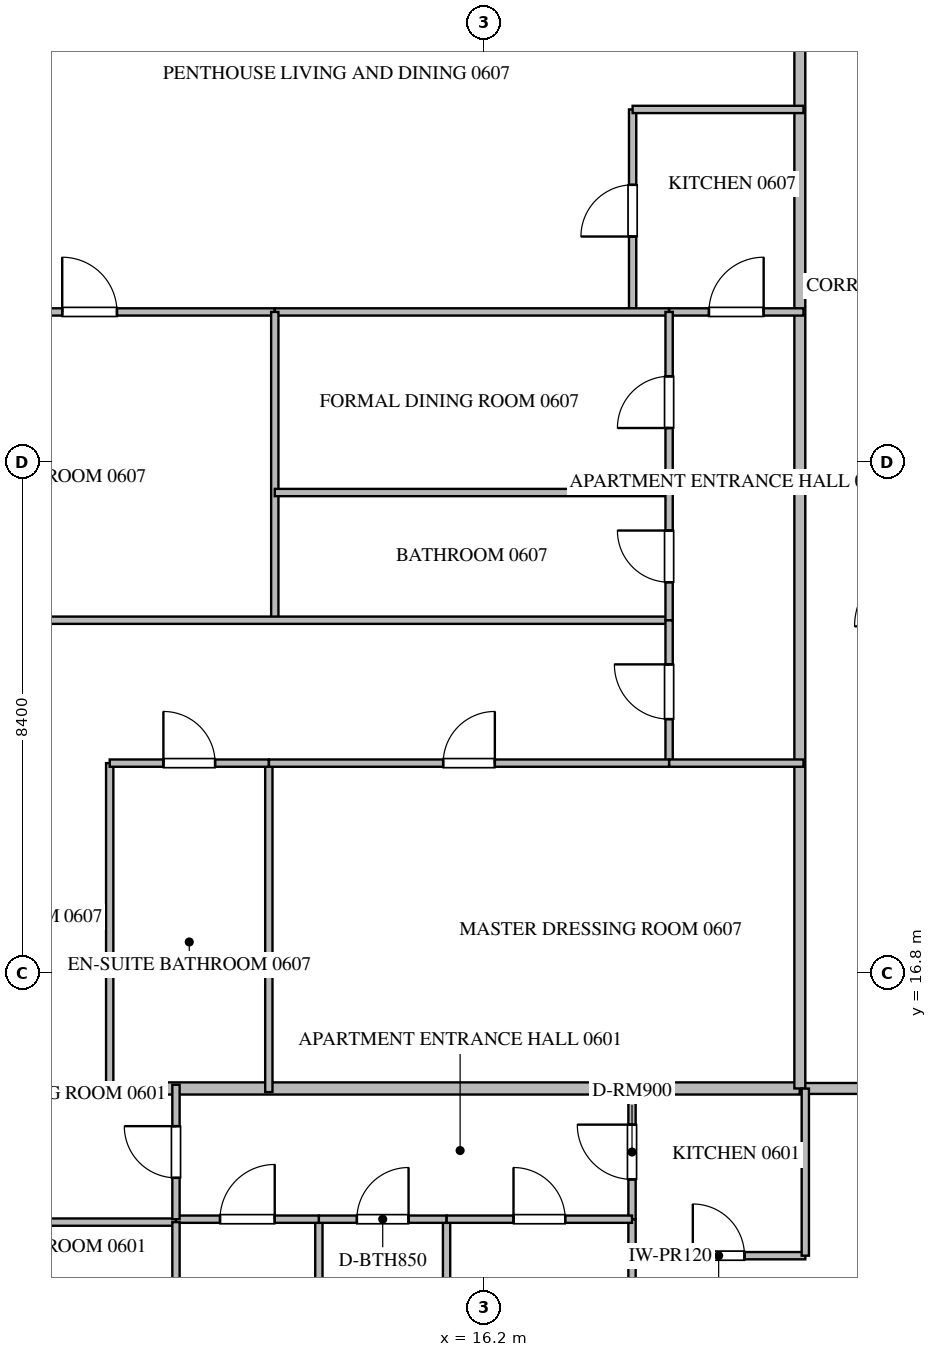
"""IFC4 building model, lengths in metres.
Left out: names, types, materials, properties, quantities, classifications, styles, units other than length and angle.
Written with IfcOpenShell. Run it as: python <this file> out.ifc"""

import sys

from ifc_helpers import new_model, si_unit, direction, frame, frame_2d, origin, place, context, subcontext, project, spatial, rectangle, extrude, source, transform, mapped, element, fill, save


model = new_model("IFC4")
c1 = context("Model", 3, precision=1e-05, world=origin(), true_north=direction((0.0, 1.0)))
c2 = subcontext(c1, "Body", "Model", "MODEL_VIEW")
j1 = project(units=[si_unit("LENGTHUNIT", "METRE"), si_unit("PLANEANGLEUNIT", "RADIAN")], contexts=[c1])
p1 = place(None, origin())
s1 = spatial("IfcSite", under=j1, at=p1, CompositionType="ELEMENT")
p2 = place(p1, origin())
s2 = spatial("IfcBuilding", under=s1, at=p2, CompositionType="ELEMENT")
p3 = place(p2, frame((0.0, 0.0, 30.45)))
s3 = spatial("IfcBuildingStorey", under=s2, at=p3, CompositionType="ELEMENT", Elevation=30.45)
p4 = place(p3, frame((6.082, 14.9, 0.0), z_axis=(0.0, 0.0, 1.0), x_axis=(1.0, 0.0, 0.0)))
e1 = element("IfcWall", 1, at=p4, inside=s3, PredefinedType="PARTITIONING", context=c2, shape_type="SweptSolid", body=[
    extrude(rectangle(XDim=15.318, YDim=0.2, at=frame_2d((7.659, 0.0))), origin(), (0.0, 0.0, 1.0), 3.49),
])
p5 = place(p3, frame((21.402, 14.9, 0.0), z_axis=(0.0, 0.0, 1.0), x_axis=(1.0, 0.0, 0.0)))
e2 = element("IfcWall", 2, at=p5, inside=s3, PredefinedType="PARTITIONING", context=c2, shape_type="SweptSolid", body=[
    extrude(rectangle(XDim=21.996, YDim=0.18, at=frame_2d((10.998, 0.0))), origin(), (0.0, 0.0, 1.0), 3.49),
])
p6 = place(p5, frame((2.1, 0.0, 0.0)))
e3 = element("IfcOpeningElement", 3, at=p6, cuts=e2, PredefinedType="OPENING", context=c2, shape_type="SweptSolid", body=[
    extrude(rectangle(XDim=1.0, YDim=2.15, at=frame_2d((0.5, 1.075))), frame((0.0, 0.1, 0.0), z_axis=(0.0, -1.0, 0.0), x_axis=(1.0, 0.0, 0.0)), (0.0, 0.0, 1.0), 0.2),
])
p7 = place(p5, frame((6.719, 0.0, 0.0)))
e4 = element("IfcOpeningElement", 4, at=p7, cuts=e2, PredefinedType="OPENING", context=c2, shape_type="SweptSolid", body=[
    extrude(rectangle(XDim=1.0, YDim=2.15, at=frame_2d((0.5, 1.075))), frame((0.0, 0.1, 0.0), z_axis=(0.0, -1.0, 0.0), x_axis=(1.0, 0.0, 0.0)), (0.0, 0.0, 1.0), 0.2),
])
p8 = place(p5, frame((18.896, 0.0, 0.0)))
e5 = element("IfcOpeningElement", 5, at=p8, cuts=e2, PredefinedType="OPENING", context=c2, shape_type="SweptSolid", body=[
    extrude(rectangle(XDim=1.0, YDim=2.15, at=frame_2d((0.5, 1.075))), frame((0.0, 0.1, 0.0), z_axis=(0.0, -1.0, 0.0), x_axis=(1.0, 0.0, 0.0)), (0.0, 0.0, 1.0), 0.2),
])
p9 = place(p3, frame((21.4, 14.9, 0.0), z_axis=(0.0, 0.0, 1.0), x_axis=(0.0, 1.0, 0.0)))
e6 = element("IfcWall", 6, at=p9, inside=s3, PredefinedType="PARTITIONING", context=c2, shape_type="SweptSolid", body=[
    extrude(rectangle(XDim=20.6, YDim=0.18, at=frame_2d((10.3, 0.0))), origin(), (0.0, 0.0, 1.0), 3.49),
])
p10 = place(p9, frame((17.64, 0.0, 0.0)))
e7 = element("IfcOpeningElement", 7, at=p10, cuts=e6, PredefinedType="OPENING", context=c2, shape_type="SweptSolid", body=[
    extrude(rectangle(XDim=1.0, YDim=2.15, at=frame_2d((0.5, 1.075))), frame((0.0, 0.1, 0.0), z_axis=(0.0, -1.0, 0.0), x_axis=(1.0, 0.0, 0.0)), (0.0, 0.0, 1.0), 0.2),
])
p11 = place(p3, frame((18.64, 12.15, 0.0), z_axis=(0.0, 0.0, 1.0), x_axis=(1.0, 0.0, 0.0)))
e8 = element("IfcWall", 8, at=p11, inside=s3, PredefinedType="PARTITIONING", context=c2, shape_type="SweptSolid", body=[
    extrude(rectangle(XDim=2.85, YDim=0.12, at=frame_2d((1.425, 0.0))), origin(), (0.0, 0.0, 1.0), 3.49),
])
p12 = place(p11, frame((1.0, 0.0, 0.0)))
e9 = element("IfcOpeningElement", 9, at=p12, cuts=e8, PredefinedType="OPENING", context=c2, shape_type="SweptSolid", body=[
    extrude(rectangle(XDim=0.85, YDim=2.1, at=frame_2d((0.425, 1.05))), frame((0.0, 0.07, 0.0), z_axis=(0.0, -1.0, 0.0), x_axis=(1.0, 0.0, 0.0)), (0.0, 0.0, 1.0), 0.14),
])
p13 = place(p3, frame((21.49, 12.15, 0.0), z_axis=(0.0, 0.0, 1.0), x_axis=(0.0, 1.0, 0.0)))
e10 = element("IfcWall", 10, at=p13, inside=s3, PredefinedType="PARTITIONING", context=c2, shape_type="SweptSolid", body=[
    extrude(rectangle(XDim=2.748, YDim=0.12, at=frame_2d((1.374, 0.0))), origin(), (0.0, 0.0, 1.0), 3.49),
])
p14 = place(p3, frame((18.64, 12.75, 0.0), z_axis=(0.0, 0.0, 1.0), x_axis=(0.0, 1.0, 0.0)))
e11 = element("IfcWall", 11, at=p14, inside=s3, PredefinedType="PARTITIONING", context=c2, shape_type="SweptSolid", body=[
    extrude(rectangle(XDim=2.21, YDim=0.12, at=frame_2d((1.105, 0.0))), origin(), (0.0, 0.0, 1.0), 3.49),
])
p15 = place(p14, frame((0.655, 0.0, 0.0)))
e12 = element("IfcOpeningElement", 12, at=p15, cuts=e11, PredefinedType="OPENING", context=c2, shape_type="SweptSolid", body=[
    extrude(rectangle(XDim=0.9, YDim=2.1, at=frame_2d((0.45, 1.05))), frame((0.0, 0.07, 0.0), z_axis=(0.0, -1.0, 0.0), x_axis=(1.0, 0.0, 0.0)), (0.0, 0.0, 1.0), 0.14),
])
p16 = place(p3, frame((18.64, 7.73, 0.0), z_axis=(0.0, 0.0, 1.0), x_axis=(0.0, 1.0, 0.0)))
e13 = element("IfcWall", 13, at=p16, inside=s3, PredefinedType="PARTITIONING", context=c2, shape_type="SweptSolid", body=[
    extrude(rectangle(XDim=5.018, YDim=0.12, at=frame_2d((2.509, 0.0))), origin(), (0.0, 0.0, 1.0), 3.49),
])
p17 = place(p3, frame((13.49, 4.495, 0.0), z_axis=(0.0, 0.0, 1.0), x_axis=(0.0, 1.0, 0.0)))
e14 = element("IfcWall", 14, at=p17, inside=s3, PredefinedType="PARTITIONING", context=c2, shape_type="SweptSolid", body=[
    extrude(rectangle(XDim=8.255, YDim=0.12, at=frame_2d((4.127, 0.0))), origin(), (0.0, 0.0, 1.0), 3.49),
])
p18 = place(p3, frame((15.59, 7.728, 0.0), z_axis=(0.0, 0.0, 1.0), x_axis=(0.0, 1.0, 0.0)))
e15 = element("IfcWall", 15, at=p18, inside=s3, PredefinedType="PARTITIONING", context=c2, shape_type="SweptSolid", body=[
    extrude(rectangle(XDim=5.022, YDim=0.12, at=frame_2d((2.511, 0.0))), origin(), (0.0, 0.0, 1.0), 3.49),
])
p19 = place(p3, frame((13.49, 12.75, 0.0), z_axis=(0.0, 0.0, 1.0), x_axis=(1.0, 0.0, 0.0)))
e16 = element("IfcWall", 16, at=p19, inside=s3, PredefinedType="PARTITIONING", context=c2, shape_type="SweptSolid", body=[
    extrude(rectangle(XDim=2.1, YDim=0.12, at=frame_2d((1.05, 0.0))), origin(), (0.0, 0.0, 1.0), 3.49),
])
p20 = place(p19, frame((0.625, 0.0, 0.0)))
e17 = element("IfcOpeningElement", 17, at=p20, cuts=e16, PredefinedType="OPENING", context=c2, shape_type="SweptSolid", body=[
    extrude(rectangle(XDim=0.85, YDim=2.1, at=frame_2d((0.425, 1.05))), frame((0.0, 0.07, 0.0), z_axis=(0.0, -1.0, 0.0), x_axis=(1.0, 0.0, 0.0)), (0.0, 0.0, 1.0), 0.14),
])
p21 = place(p3, frame((15.592, 12.75, 0.0), z_axis=(0.0, 0.0, 1.0), x_axis=(1.0, 0.0, 0.0)))
e18 = element("IfcWall", 18, at=p21, inside=s3, PredefinedType="PARTITIONING", context=c2, shape_type="SweptSolid", body=[
    extrude(rectangle(XDim=3.048, YDim=0.12, at=frame_2d((1.524, 0.0))), origin(), (0.0, 0.0, 1.0), 3.49),
])
p22 = place(p21, frame((1.099, 0.0, 0.0)))
e19 = element("IfcOpeningElement", 19, at=p22, cuts=e18, PredefinedType="OPENING", context=c2, shape_type="SweptSolid", body=[
    extrude(rectangle(XDim=0.85, YDim=2.1, at=frame_2d((0.425, 1.05))), frame((0.0, 0.07, 0.0), z_axis=(0.0, -1.0, 0.0), x_axis=(1.0, 0.0, 0.0)), (0.0, 0.0, 1.0), 0.14),
])
p23 = place(p3, frame((11.14, 12.75, 0.0), z_axis=(0.0, 0.0, 1.0), x_axis=(1.0, 0.0, 0.0)))
e20 = element("IfcWall", 20, at=p23, inside=s3, PredefinedType="PARTITIONING", context=c2, shape_type="SweptSolid", body=[
    extrude(rectangle(XDim=2.348, YDim=0.12, at=frame_2d((1.174, 0.0))), origin(), (0.0, 0.0, 1.0), 3.49),
])
p24 = place(p23, frame((0.724, 0.0, 0.0)))
e21 = element("IfcOpeningElement", 21, at=p24, cuts=e20, PredefinedType="OPENING", context=c2, shape_type="SweptSolid", body=[
    extrude(rectangle(XDim=0.9, YDim=2.1, at=frame_2d((0.45, 1.05))), frame((0.0, 0.07, 0.0), z_axis=(0.0, -1.0, 0.0), x_axis=(1.0, 0.0, 0.0)), (0.0, 0.0, 1.0), 0.14),
])
p25 = place(p3, frame((6.095, 12.702, 0.0), z_axis=(0.0, 0.0, 1.0), x_axis=(1.0, 0.0, 0.0)))
e22 = element("IfcWall", 22, at=p25, inside=s3, PredefinedType="PARTITIONING", context=c2, shape_type="SweptSolid", body=[
    extrude(rectangle(XDim=5.043, YDim=0.12, at=frame_2d((2.521, 0.0))), origin(), (0.0, 0.0, 1.0), 3.49),
])
p26 = place(p3, frame((11.14, 9.894, 0.0), z_axis=(0.0, 0.0, 1.0), x_axis=(0.0, 1.0, 0.0)))
e23 = element("IfcWall", 23, at=p26, inside=s3, PredefinedType="PARTITIONING", context=c2, shape_type="SweptSolid", body=[
    extrude(rectangle(XDim=2.808, YDim=0.12, at=frame_2d((1.404, 0.0))), origin(), (0.0, 0.0, 1.0), 3.49),
])
p27 = place(p26, frame((0.979, 0.0, 0.0)))
e24 = element("IfcOpeningElement", 24, at=p27, cuts=e23, PredefinedType="OPENING", context=c2, shape_type="SweptSolid", body=[
    extrude(rectangle(XDim=0.85, YDim=2.1, at=frame_2d((0.425, 1.05))), frame((0.0, 0.07, 0.0), z_axis=(0.0, -1.0, 0.0), x_axis=(1.0, 0.0, 0.0)), (0.0, 0.0, 1.0), 0.14),
])
p28 = place(p3, frame((11.14, 12.75, 0.0), z_axis=(0.0, 0.0, 1.0), x_axis=(0.0, 1.0, 0.0)))
e25 = element("IfcWall", 25, at=p28, inside=s3, PredefinedType="PARTITIONING", context=c2, shape_type="SweptSolid", body=[
    extrude(rectangle(XDim=2.21, YDim=0.12, at=frame_2d((1.105, 0.0))), origin(), (0.0, 0.0, 1.0), 3.49),
])
p29 = place(p28, frame((0.68, 0.0, 0.0)))
e26 = element("IfcOpeningElement", 26, at=p29, cuts=e25, PredefinedType="OPENING", context=c2, shape_type="SweptSolid", body=[
    extrude(rectangle(XDim=0.85, YDim=2.1, at=frame_2d((0.425, 1.05))), frame((0.0, 0.07, 0.0), z_axis=(0.0, -1.0, 0.0), x_axis=(1.0, 0.0, 0.0)), (0.0, 0.0, 1.0), 0.14),
])
p30 = place(p3, frame((18.65, 27.67, 0.0), z_axis=(0.0, 0.0, 1.0), x_axis=(0.0, 1.0, 0.0)))
e27 = element("IfcWall", 27, at=p30, inside=s3, PredefinedType="PARTITIONING", context=c2, shape_type="SweptSolid", body=[
    extrude(rectangle(XDim=3.33, YDim=0.12, at=frame_2d((1.665, 0.0))), origin(), (0.0, 0.0, 1.0), 3.49),
])
p31 = place(p30, frame((1.24, 0.0, 0.0)))
e28 = element("IfcOpeningElement", 28, at=p31, cuts=e27, PredefinedType="OPENING", context=c2, shape_type="SweptSolid", body=[
    extrude(rectangle(XDim=0.85, YDim=2.1, at=frame_2d((0.425, 1.05))), frame((0.0, 0.07, 0.0), z_axis=(0.0, -1.0, 0.0), x_axis=(1.0, 0.0, 0.0)), (0.0, 0.0, 1.0), 0.14),
])
p32 = place(p3, frame((18.65, 31.0, 0.0), z_axis=(0.0, 0.0, 1.0), x_axis=(1.0, 0.0, 0.0)))
e29 = element("IfcWall", 29, at=p32, inside=s3, PredefinedType="PARTITIONING", context=c2, shape_type="SweptSolid", body=[
    extrude(rectangle(XDim=2.81, YDim=0.12, at=frame_2d((1.405, 0.0))), origin(), (0.0, 0.0, 1.0), 3.49),
])
p33 = place(p3, frame((19.25, 27.67, 0.0), z_axis=(0.0, 0.0, 1.0), x_axis=(1.0, 0.0, 0.0)))
e30 = element("IfcWall", 30, at=p33, inside=s3, PredefinedType="PARTITIONING", context=c2, shape_type="SweptSolid", body=[
    extrude(rectangle(XDim=2.21, YDim=0.12, at=frame_2d((1.105, 0.0))), origin(), (0.0, 0.0, 1.0), 3.49),
])
p34 = place(p33, frame((0.655, 0.0, 0.0)))
e31 = element("IfcOpeningElement", 31, at=p34, cuts=e30, PredefinedType="OPENING", context=c2, shape_type="SweptSolid", body=[
    extrude(rectangle(XDim=0.9, YDim=2.1, at=frame_2d((0.45, 1.05))), frame((0.0, 0.07, 0.0), z_axis=(0.0, -1.0, 0.0), x_axis=(1.0, 0.0, 0.0)), (0.0, 0.0, 1.0), 0.14),
])
p35 = place(p3, frame((6.095, 27.67, 0.0), z_axis=(0.0, 0.0, 1.0), x_axis=(1.0, 0.0, 0.0)))
e32 = element("IfcWall", 32, at=p35, inside=s3, PredefinedType="PARTITIONING", context=c2, shape_type="SweptSolid", body=[
    extrude(rectangle(XDim=6.67, YDim=0.12, at=frame_2d((3.335, 0.0))), origin(), (0.0, 0.0, 1.0), 3.49),
])
p36 = place(p35, frame((3.174, 0.0, 0.0)))
e33 = element("IfcOpeningElement", 33, at=p36, cuts=e32, PredefinedType="OPENING", context=c2, shape_type="SweptSolid", body=[
    extrude(rectangle(XDim=0.9, YDim=2.1, at=frame_2d((0.45, 1.05))), frame((0.0, 0.07, 0.0), z_axis=(0.0, -1.0, 0.0), x_axis=(1.0, 0.0, 0.0)), (0.0, 0.0, 1.0), 0.14),
])
p37 = place(p3, frame((12.767, 27.67, 0.0), z_axis=(0.0, 0.0, 1.0), x_axis=(1.0, 0.0, 0.0)))
e34 = element("IfcWall", 34, at=p37, inside=s3, PredefinedType="PARTITIONING", context=c2, shape_type="SweptSolid", body=[
    extrude(rectangle(XDim=6.481, YDim=0.12, at=frame_2d((3.24, 0.0))), origin(), (0.0, 0.0, 1.0), 3.49),
])
p38 = place(p3, frame((12.765, 22.6, 0.0), z_axis=(0.0, 0.0, 1.0), x_axis=(0.0, 1.0, 0.0)))
e35 = element("IfcWall", 35, at=p38, inside=s3, PredefinedType="PARTITIONING", context=c2, shape_type="SweptSolid", body=[
    extrude(rectangle(XDim=5.07, YDim=0.12, at=frame_2d((2.535, 0.0))), origin(), (0.0, 0.0, 1.0), 3.49),
])
p39 = place(p3, frame((6.095, 22.6, 0.0), z_axis=(0.0, 0.0, 1.0), x_axis=(1.0, 0.0, 0.0)))
e36 = element("IfcWall", 36, at=p39, inside=s3, PredefinedType="PARTITIONING", context=c2, shape_type="SweptSolid", body=[
    extrude(rectangle(XDim=13.155, YDim=0.12, at=frame_2d((6.578, 0.0))), origin(), (0.0, 0.0, 1.0), 3.49),
])
p40 = place(p3, frame((12.765, 24.7, 0.0), z_axis=(0.0, 0.0, 1.0), x_axis=(1.0, 0.0, 0.0)))
e37 = element("IfcWall", 37, at=p40, inside=s3, PredefinedType="PARTITIONING", context=c2, shape_type="SweptSolid", body=[
    extrude(rectangle(XDim=6.485, YDim=0.12, at=frame_2d((3.243, 0.0))), origin(), (0.0, 0.0, 1.0), 3.49),
])
p41 = place(p3, frame((19.25, 22.6, 0.0), z_axis=(0.0, 0.0, 1.0), x_axis=(0.0, 1.0, 0.0)))
e38 = element("IfcWall", 38, at=p41, inside=s3, PredefinedType="PARTITIONING", context=c2, shape_type="SweptSolid", body=[
    extrude(rectangle(XDim=2.1, YDim=0.12, at=frame_2d((1.05, 0.0))), origin(), (0.0, 0.0, 1.0), 3.49),
])
p42 = place(p41, frame((0.625, 0.0, 0.0)))
e39 = element("IfcOpeningElement", 39, at=p42, cuts=e38, PredefinedType="OPENING", context=c2, shape_type="SweptSolid", body=[
    extrude(rectangle(XDim=0.85, YDim=2.1, at=frame_2d((0.425, 1.05))), frame((0.0, 0.07, 0.0), z_axis=(0.0, -1.0, 0.0), x_axis=(1.0, 0.0, 0.0)), (0.0, 0.0, 1.0), 0.14),
])
p43 = place(p3, frame((19.25, 24.702, 0.0), z_axis=(0.0, 0.0, 1.0), x_axis=(0.0, 1.0, 0.0)))
e40 = element("IfcWall", 40, at=p43, inside=s3, PredefinedType="PARTITIONING", context=c2, shape_type="SweptSolid", body=[
    extrude(rectangle(XDim=2.968, YDim=0.12, at=frame_2d((1.484, 0.0))), origin(), (0.0, 0.0, 1.0), 3.49),
])
p44 = place(p43, frame((1.059, 0.0, 0.0)))
e41 = element("IfcOpeningElement", 41, at=p44, cuts=e40, PredefinedType="OPENING", context=c2, shape_type="SweptSolid", body=[
    extrude(rectangle(XDim=0.85, YDim=2.1, at=frame_2d((0.425, 1.05))), frame((0.0, 0.07, 0.0), z_axis=(0.0, -1.0, 0.0), x_axis=(1.0, 0.0, 0.0)), (0.0, 0.0, 1.0), 0.14),
])
p45 = place(p3, frame((19.25, 20.25, 0.0), z_axis=(0.0, 0.0, 1.0), x_axis=(0.0, 1.0, 0.0)))
e42 = element("IfcWall", 42, at=p45, inside=s3, PredefinedType="PARTITIONING", context=c2, shape_type="SweptSolid", body=[
    extrude(rectangle(XDim=2.348, YDim=0.12, at=frame_2d((1.174, 0.0))), origin(), (0.0, 0.0, 1.0), 3.49),
])
p46 = place(p45, frame((0.724, 0.0, 0.0)))
e43 = element("IfcOpeningElement", 43, at=p46, cuts=e42, PredefinedType="OPENING", context=c2, shape_type="SweptSolid", body=[
    extrude(rectangle(XDim=0.9, YDim=2.1, at=frame_2d((0.45, 1.05))), frame((0.0, 0.07, 0.0), z_axis=(0.0, -1.0, 0.0), x_axis=(1.0, 0.0, 0.0)), (0.0, 0.0, 1.0), 0.14),
])
for number, where, z_axis, x_axis in (
    (44, (10.05, 14.84, 0.0), (0.0, 0.0, 1.0), (0.0, 1.0, 0.0)),
    (45, (12.667, 14.84, 0.0), (0.0, 0.0, 1.0), (0.0, 1.0, 0.0)),
):
    element("IfcWall", number, at=place(p3, frame(where, z_axis=z_axis, x_axis=x_axis)), inside=s3, PredefinedType="PARTITIONING", context=c2, shape_type="SweptSolid", body=[
        extrude(rectangle(XDim=5.41, YDim=0.12, at=frame_2d((2.705, 0.0))), origin(), (0.0, 0.0, 1.0), 3.49),
    ])
p47 = place(p3, frame((10.05, 20.25, 0.0), z_axis=(0.0, 0.0, 1.0), x_axis=(1.0, 0.0, 0.0)))
e46 = element("IfcWall", 46, at=p47, inside=s3, PredefinedType="PARTITIONING", context=c2, shape_type="SweptSolid", body=[
    extrude(rectangle(XDim=2.617, YDim=0.12, at=frame_2d((1.309, 0.0))), origin(), (0.0, 0.0, 1.0), 3.49),
])
p48 = place(p47, frame((0.883, 0.0, 0.0)))
e47 = element("IfcOpeningElement", 47, at=p48, cuts=e46, PredefinedType="OPENING", context=c2, shape_type="SweptSolid", body=[
    extrude(rectangle(XDim=0.85, YDim=2.1, at=frame_2d((0.425, 1.05))), frame((0.0, 0.07, 0.0), z_axis=(0.0, -1.0, 0.0), x_axis=(1.0, 0.0, 0.0)), (0.0, 0.0, 1.0), 0.14),
])
p49 = place(p3, frame((12.669, 20.25, 0.0), z_axis=(0.0, 0.0, 1.0), x_axis=(1.0, 0.0, 0.0)))
e48 = element("IfcWall", 48, at=p49, inside=s3, PredefinedType="PARTITIONING", context=c2, shape_type="SweptSolid", body=[
    extrude(rectangle(XDim=6.581, YDim=0.12, at=frame_2d((3.291, 0.0))), origin(), (0.0, 0.0, 1.0), 3.49),
])
p50 = place(p49, frame((2.865, 0.0, 0.0)))
e49 = element("IfcOpeningElement", 49, at=p50, cuts=e48, PredefinedType="OPENING", context=c2, shape_type="SweptSolid", body=[
    extrude(rectangle(XDim=0.85, YDim=2.1, at=frame_2d((0.425, 1.05))), frame((0.0, 0.07, 0.0), z_axis=(0.0, -1.0, 0.0), x_axis=(1.0, 0.0, 0.0)), (0.0, 0.0, 1.0), 0.14),
])
p51 = place(p3, frame((19.252, 20.25, 0.0), z_axis=(0.0, 0.0, 1.0), x_axis=(1.0, 0.0, 0.0)))
e50 = element("IfcWall", 50, at=p51, inside=s3, PredefinedType="PARTITIONING", context=c2, shape_type="SweptSolid", body=[
    extrude(rectangle(XDim=2.208, YDim=0.12, at=frame_2d((1.104, 0.0))), origin(), (0.0, 0.0, 1.0), 3.49),
])
m1 = source(origin(), c2, "Body", "SweptSolid", [
    extrude(rectangle(XDim=0.85, YDim=2.1, at=frame_2d((0.425, 1.05))), frame((0.0, 0.025, 0.0), z_axis=(0.0, -1.0, 0.0), x_axis=(1.0, 0.0, 0.0)), (0.0, 0.0, 1.0), 0.05),
])
p52 = place(p12, origin())
e51 = element("IfcDoor", 51, at=p52, inside=s3, OperationType="SINGLE_SWING_LEFT", PredefinedType="DOOR", context=c2, shape_type="MappedRepresentation", body=[
    mapped(m1, transform((0.0, 0.0, 0.0), scale=1.0)),
])
fill(e9, e51)
m2 = source(origin(), c2, "Body", "SweptSolid", [
    extrude(rectangle(XDim=0.9, YDim=2.1, at=frame_2d((0.45, 1.05))), frame((0.0, 0.025, 0.0), z_axis=(0.0, -1.0, 0.0), x_axis=(1.0, 0.0, 0.0)), (0.0, 0.0, 1.0), 0.05),
])
p53 = place(p15, origin())
e52 = element("IfcDoor", 52, at=p53, inside=s3, OperationType="SINGLE_SWING_RIGHT", PredefinedType="DOOR", context=c2, shape_type="MappedRepresentation", body=[
    mapped(m2, transform((0.0, 0.0, 0.0), scale=1.0)),
])
fill(e12, e52)
p54 = place(p20, origin())
e53 = element("IfcDoor", 53, at=p54, inside=s3, OperationType="SINGLE_SWING_RIGHT", PredefinedType="DOOR", context=c2, shape_type="MappedRepresentation", body=[
    mapped(m1, transform((0.0, 0.0, 0.0), scale=1.0)),
])
fill(e17, e53)
p55 = place(p22, origin())
e54 = element("IfcDoor", 54, at=p55, inside=s3, OperationType="SINGLE_SWING_LEFT", PredefinedType="DOOR", context=c2, shape_type="MappedRepresentation", body=[
    mapped(m1, transform((0.0, 0.0, 0.0), scale=1.0)),
])
fill(e19, e54)
p56 = place(p24, origin())
e55 = element("IfcDoor", 55, at=p56, inside=s3, OperationType="SINGLE_SWING_RIGHT", PredefinedType="DOOR", context=c2, shape_type="MappedRepresentation", body=[
    mapped(m2, transform((0.0, 0.0, 0.0), scale=1.0)),
])
fill(e21, e55)
p57 = place(p29, origin())
e56 = element("IfcDoor", 56, at=p57, inside=s3, OperationType="SINGLE_SWING_RIGHT", PredefinedType="DOOR", context=c2, shape_type="MappedRepresentation", body=[
    mapped(m1, transform((0.0, 0.0, 0.0), scale=1.0)),
])
fill(e26, e56)
p58 = place(p31, origin())
e57 = element("IfcDoor", 57, at=p58, inside=s3, OperationType="SINGLE_SWING_LEFT", PredefinedType="DOOR", context=c2, shape_type="MappedRepresentation", body=[
    mapped(m1, transform((0.0, 0.0, 0.0), scale=1.0)),
])
fill(e28, e57)
p59 = place(p34, origin())
e58 = element("IfcDoor", 58, at=p59, inside=s3, OperationType="SINGLE_SWING_RIGHT", PredefinedType="DOOR", context=c2, shape_type="MappedRepresentation", body=[
    mapped(m2, transform((0.0, 0.0, 0.0), scale=1.0)),
])
fill(e31, e58)
p60 = place(p36, origin())
e59 = element("IfcDoor", 59, at=p60, inside=s3, OperationType="SINGLE_SWING_LEFT", PredefinedType="DOOR", context=c2, shape_type="MappedRepresentation", body=[
    mapped(m2, transform((0.0, 0.0, 0.0), scale=1.0)),
])
fill(e33, e59)
p61 = place(p42, origin())
e60 = element("IfcDoor", 60, at=p61, inside=s3, OperationType="SINGLE_SWING_RIGHT", PredefinedType="DOOR", context=c2, shape_type="MappedRepresentation", body=[
    mapped(m1, transform((0.0, 0.0, 0.0), scale=1.0)),
])
fill(e39, e60)
p62 = place(p44, origin())
e61 = element("IfcDoor", 61, at=p62, inside=s3, OperationType="SINGLE_SWING_LEFT", PredefinedType="DOOR", context=c2, shape_type="MappedRepresentation", body=[
    mapped(m1, transform((0.0, 0.0, 0.0), scale=1.0)),
])
fill(e41, e61)
p63 = place(p46, origin())
e62 = element("IfcDoor", 62, at=p63, inside=s3, OperationType="SINGLE_SWING_RIGHT", PredefinedType="DOOR", context=c2, shape_type="MappedRepresentation", body=[
    mapped(m2, transform((0.0, 0.0, 0.0), scale=1.0)),
])
fill(e43, e62)
p64 = place(p48, origin())
e63 = element("IfcDoor", 63, at=p64, inside=s3, OperationType="SINGLE_SWING_LEFT", PredefinedType="DOOR", context=c2, shape_type="MappedRepresentation", body=[
    mapped(m1, transform((0.0, 0.0, 0.0), scale=1.0)),
])
fill(e47, e63)
p65 = place(p50, origin())
e64 = element("IfcDoor", 64, at=p65, inside=s3, OperationType="SINGLE_SWING_RIGHT", PredefinedType="DOOR", context=c2, shape_type="MappedRepresentation", body=[
    mapped(m1, transform((0.0, 0.0, 0.0), scale=1.0)),
])
fill(e49, e64)
save(model, sys.argv[1])
